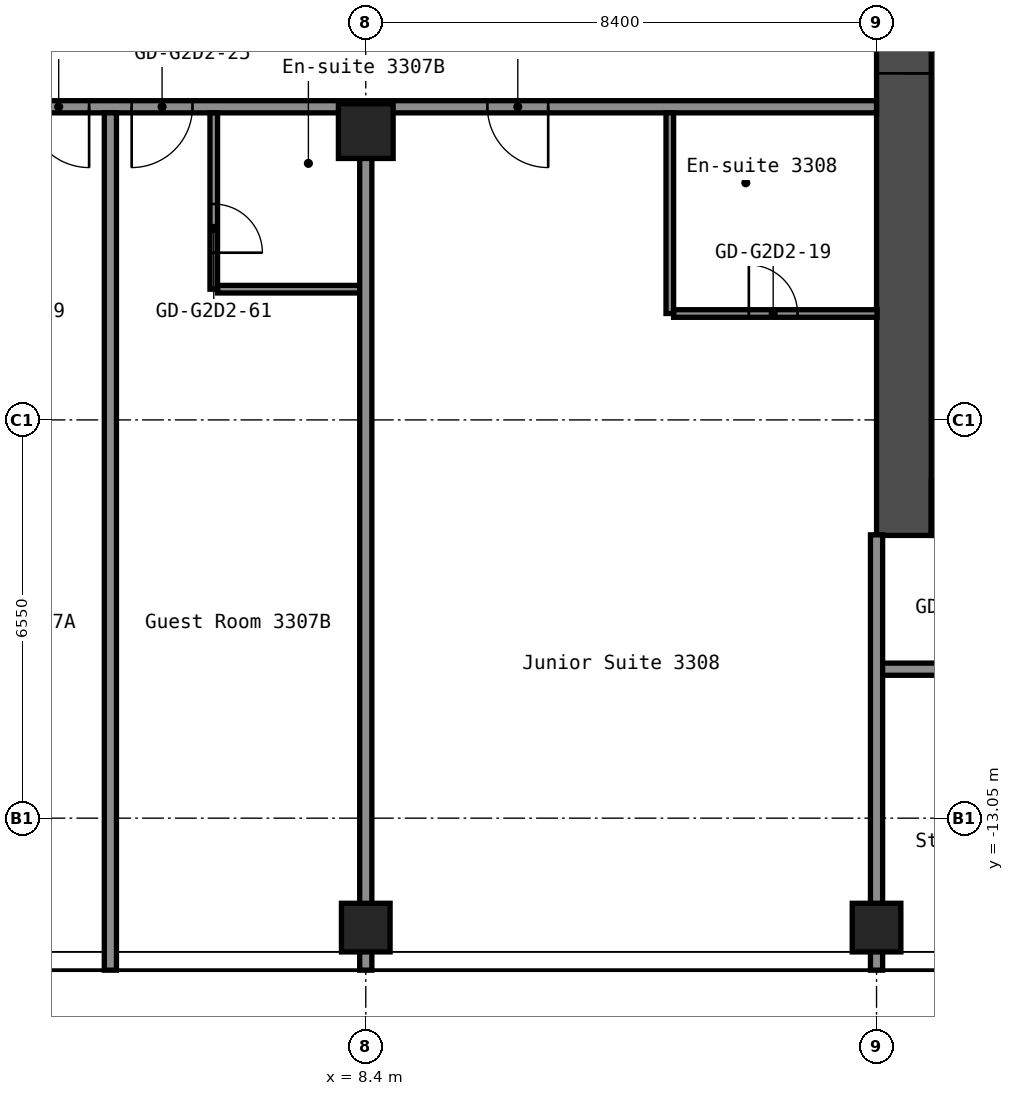
"""IFC4 building model, lengths in metres.
Left out: names, types, materials, properties, quantities, classifications, styles, units other than length and angle.
Written with IfcOpenShell. Run it as: python <this file> out.ifc"""

import sys

from ifc_helpers import new_model, si_unit, direction, frame, frame_2d, origin, origin_2d, place, context, subcontext, project, spatial, rectangle, hollow_rectangle, extrude, element, fill, save


model = new_model("IFC4")
c1 = context("Model", 3, precision=1e-05, world=origin(), true_north=direction((0.0, 1.0)))
c2 = subcontext(c1, "Body", "Model", "MODEL_VIEW")
j1 = project(units=[si_unit("LENGTHUNIT", "METRE"), si_unit("PLANEANGLEUNIT", "RADIAN")], contexts=[c1])
p1 = place(None, origin())
s1 = spatial("IfcSite", under=j1, at=p1, CompositionType="ELEMENT")
p2 = place(p1, origin())
s2 = spatial("IfcBuilding", under=s1, at=p2, CompositionType="ELEMENT")
p3 = place(p2, frame((0.0, 0.0, 117.0)))
s3 = spatial("IfcBuildingStorey", under=s2, at=p3, CompositionType="ELEMENT", Elevation=117.0)
p4 = place(p3, frame((8.4, -14.85, 0.0), z_axis=(0.0, 0.0, 1.0), x_axis=(1.0, 0.0, 0.0)))
e1 = element("IfcColumn", 1, at=p4, inside=s3, PredefinedType="COLUMN", context=c2, shape_type="SweptSolid", body=[
    extrude(hollow_rectangle(XDim=0.8, YDim=0.8, WallThickness=0.032, at=origin_2d()), origin(), (0.0, 0.0, 1.0), 2.9),
])
p5 = place(p3, frame((8.4, -1.75, 0.0), z_axis=(0.0, 0.0, 1.0), x_axis=(1.0, 0.0, 0.0)))
e2 = element("IfcColumn", 2, at=p5, inside=s3, PredefinedType="COLUMN", context=c2, shape_type="SweptSolid", body=[
    extrude(hollow_rectangle(XDim=0.9, YDim=0.9, WallThickness=0.036, at=origin_2d()), origin(), (0.0, 0.0, 1.0), 2.9),
])
p6 = place(p3, frame((16.8, -14.85, 0.0), z_axis=(0.0, 0.0, 1.0), x_axis=(1.0, 0.0, 0.0)))
e3 = element("IfcColumn", 3, at=p6, inside=s3, PredefinedType="COLUMN", context=c2, shape_type="SweptSolid", body=[
    extrude(hollow_rectangle(XDim=0.8, YDim=0.8, WallThickness=0.032, at=origin_2d()), origin(), (0.0, 0.0, 1.0), 2.9),
])
p7 = place(p3, frame((17.25, -8.4, 0.0), z_axis=(0.0, 0.0, 1.0), x_axis=(0.0, 1.0, 0.0)))
e4 = element("IfcWall", 4, at=p7, inside=s3, PredefinedType="SHEAR", context=c2, shape_type="SweptSolid", body=[
    extrude(rectangle(XDim=16.8, YDim=0.9, at=frame_2d((8.4, 0.0))), origin(), (0.0, 0.0, 1.0), 2.9),
])
p8 = place(p7, frame((7.6, 0.0, 0.0)))
e5 = element("IfcOpeningElement", 5, at=p8, cuts=e4, PredefinedType="OPENING", context=c2, shape_type="SweptSolid", body=[
    extrude(rectangle(XDim=1.2, YDim=2.1, at=frame_2d((0.6, 1.05))), frame((0.0, 0.46, 0.0), z_axis=(0.0, -1.0, 0.0), x_axis=(1.0, 0.0, 0.0)), (0.0, 0.0, 1.0), 0.92),
])
p9 = place(p3, frame((17.7, -7.95, 0.0), z_axis=(0.0, 0.0, 1.0), x_axis=(1.0, 0.0, 0.0)))
e6 = element("IfcWall", 6, at=p9, inside=s3, PredefinedType="SHEAR", context=c2, shape_type="SweptSolid", body=[
    extrude(rectangle(XDim=15.0, YDim=0.9, at=frame_2d((7.5, 0.0))), origin(), (0.0, 0.0, 1.0), 2.9),
])
p10 = place(p9, frame((2.55, 0.0, 0.0)))
e7 = element("IfcOpeningElement", 7, at=p10, cuts=e6, PredefinedType="OPENING", context=c2, shape_type="SweptSolid", body=[
    extrude(rectangle(XDim=1.0, YDim=2.1, at=frame_2d((0.5, 1.05))), frame((0.0, 0.46, 0.0), z_axis=(0.0, -1.0, 0.0), x_axis=(1.0, 0.0, 0.0)), (0.0, 0.0, 1.0), 0.92),
])
p11 = place(p3, frame((16.8, -10.6, 0.0), z_axis=(0.0, 0.0, 1.0), x_axis=(1.0, 0.0, 0.0)))
e8 = element("IfcWall", 8, at=p11, inside=s3, PredefinedType="PARTITIONING", context=c2, shape_type="SweptSolid", body=[
    extrude(rectangle(XDim=29.7, YDim=0.2, at=frame_2d((14.85, 0.0))), origin(), (0.0, 0.0, 1.0), 2.9),
])
p12 = place(p11, frame((1.145, 0.0, 0.0)))
e9 = element("IfcOpeningElement", 9, at=p12, cuts=e8, PredefinedType="OPENING", context=c2, shape_type="SweptSolid", body=[
    extrude(rectangle(XDim=0.9, YDim=2.1, at=frame_2d((0.45, 1.05))), frame((0.0, 0.11, 0.0), z_axis=(0.0, -1.0, 0.0), x_axis=(1.0, 0.0, 0.0)), (0.0, 0.0, 1.0), 0.22),
])
p13 = place(p11, frame((5.345, 0.0, 0.0)))
e10 = element("IfcOpeningElement", 10, at=p13, cuts=e8, PredefinedType="OPENING", context=c2, shape_type="SweptSolid", body=[
    extrude(rectangle(XDim=0.9, YDim=2.1, at=frame_2d((0.45, 1.05))), frame((0.0, 0.11, 0.0), z_axis=(0.0, -1.0, 0.0), x_axis=(1.0, 0.0, 0.0)), (0.0, 0.0, 1.0), 0.22),
])
p14 = place(p11, frame((10.22, 0.0, 0.0)))
e11 = element("IfcOpeningElement", 11, at=p14, cuts=e8, PredefinedType="OPENING", context=c2, shape_type="SweptSolid", body=[
    extrude(rectangle(XDim=0.9, YDim=2.1, at=frame_2d((0.45, 1.05))), frame((0.0, 0.11, 0.0), z_axis=(0.0, -1.0, 0.0), x_axis=(1.0, 0.0, 0.0)), (0.0, 0.0, 1.0), 0.22),
])
p15 = place(p11, frame((14.42, 0.0, 0.0)))
e12 = element("IfcOpeningElement", 12, at=p15, cuts=e8, PredefinedType="OPENING", context=c2, shape_type="SweptSolid", body=[
    extrude(rectangle(XDim=0.9, YDim=2.1, at=frame_2d((0.45, 1.05))), frame((0.0, 0.11, 0.0), z_axis=(0.0, -1.0, 0.0), x_axis=(1.0, 0.0, 0.0)), (0.0, 0.0, 1.0), 0.22),
])
p16 = place(p11, frame((18.7, 0.0, 0.0)))
e13 = element("IfcOpeningElement", 13, at=p16, cuts=e8, PredefinedType="OPENING", context=c2, shape_type="SweptSolid", body=[
    extrude(rectangle(XDim=0.9, YDim=2.1, at=frame_2d((0.45, 1.05))), frame((0.0, 0.11, 0.0), z_axis=(0.0, -1.0, 0.0), x_axis=(1.0, 0.0, 0.0)), (0.0, 0.0, 1.0), 0.22),
])
p17 = place(p11, frame((22.9, 0.0, 0.0)))
e14 = element("IfcOpeningElement", 14, at=p17, cuts=e8, PredefinedType="OPENING", context=c2, shape_type="SweptSolid", body=[
    extrude(rectangle(XDim=0.9, YDim=2.1, at=frame_2d((0.45, 1.05))), frame((0.0, 0.11, 0.0), z_axis=(0.0, -1.0, 0.0), x_axis=(1.0, 0.0, 0.0)), (0.0, 0.0, 1.0), 0.22),
])
p18 = place(p11, frame((26.85, 0.0, 0.0)))
e15 = element("IfcOpeningElement", 15, at=p18, cuts=e8, PredefinedType="OPENING", context=c2, shape_type="SweptSolid", body=[
    extrude(rectangle(XDim=0.9, YDim=2.1, at=frame_2d((0.45, 1.05))), frame((0.0, 0.11, 0.0), z_axis=(0.0, -1.0, 0.0), x_axis=(1.0, 0.0, 0.0)), (0.0, 0.0, 1.0), 0.22),
])
p19 = place(p3, frame((13.462, -4.75, 0.0), z_axis=(0.0, 0.0, 1.0), x_axis=(1.0, 0.0, 0.0)))
e16 = element("IfcWall", 16, at=p19, inside=s3, PredefinedType="PARTITIONING", context=c2, shape_type="SweptSolid", body=[
    extrude(rectangle(XDim=3.348, YDim=0.125, at=frame_2d((1.674, 0.0))), origin(), (0.0, 0.0, 1.0), 2.9),
])
p20 = place(p19, frame((1.238, 0.0, 0.0)))
e17 = element("IfcOpeningElement", 17, at=p20, cuts=e16, PredefinedType="OPENING", context=c2, shape_type="SweptSolid", body=[
    extrude(rectangle(XDim=0.8, YDim=2.1, at=frame_2d((0.4, 1.05))), frame((0.0, 0.073, 0.0), z_axis=(0.0, -1.0, 0.0), x_axis=(1.0, 0.0, 0.0)), (0.0, 0.0, 1.0), 0.145),
])
p21 = place(p3, frame((5.962, -4.35, 0.0), z_axis=(0.0, 0.0, 1.0), x_axis=(1.0, 0.0, 0.0)))
e18 = element("IfcWall", 18, at=p21, inside=s3, PredefinedType="PARTITIONING", context=c2, shape_type="SweptSolid", body=[
    extrude(rectangle(XDim=2.338, YDim=0.125, at=frame_2d((1.169, 0.0))), origin(), (0.0, 0.0, 1.0), 2.9),
])
p22 = place(p3, frame((-16.8, -1.35, 0.0), z_axis=(0.0, 0.0, 1.0), x_axis=(1.0, 0.0, 0.0)))
e19 = element("IfcWall", 19, at=p22, inside=s3, PredefinedType="PARTITIONING", context=c2, shape_type="SweptSolid", body=[
    extrude(rectangle(XDim=33.6, YDim=0.2, at=frame_2d((16.8, 0.0))), origin(), (0.0, 0.0, 1.0), 2.9),
])
p23 = place(p22, frame((2.85, 0.0, 0.0)))
e20 = element("IfcOpeningElement", 20, at=p23, cuts=e19, PredefinedType="OPENING", context=c2, shape_type="SweptSolid", body=[
    extrude(rectangle(XDim=1.0, YDim=2.1, at=frame_2d((0.5, 1.05))), frame((0.0, 0.11, 0.0), z_axis=(0.0, -1.0, 0.0), x_axis=(1.0, 0.0, 0.0)), (0.0, 0.0, 1.0), 0.22),
])
p24 = place(p22, frame((4.55, 0.0, 0.0)))
e21 = element("IfcOpeningElement", 21, at=p24, cuts=e19, PredefinedType="OPENING", context=c2, shape_type="SweptSolid", body=[
    extrude(rectangle(XDim=1.0, YDim=2.1, at=frame_2d((0.5, 1.05))), frame((0.0, 0.11, 0.0), z_axis=(0.0, -1.0, 0.0), x_axis=(1.0, 0.0, 0.0)), (0.0, 0.0, 1.0), 0.22),
])
p25 = place(p22, frame((9.88, 0.0, 0.0)))
e22 = element("IfcOpeningElement", 22, at=p25, cuts=e19, PredefinedType="OPENING", context=c2, shape_type="SweptSolid", body=[
    extrude(rectangle(XDim=0.9, YDim=2.1, at=frame_2d((0.45, 1.05))), frame((0.0, 0.11, 0.0), z_axis=(0.0, -1.0, 0.0), x_axis=(1.0, 0.0, 0.0)), (0.0, 0.0, 1.0), 0.22),
])
p26 = place(p22, frame((14.08, 0.0, 0.0)))
e23 = element("IfcOpeningElement", 23, at=p26, cuts=e19, PredefinedType="OPENING", context=c2, shape_type="SweptSolid", body=[
    extrude(rectangle(XDim=0.9, YDim=2.1, at=frame_2d((0.45, 1.05))), frame((0.0, 0.11, 0.0), z_axis=(0.0, -1.0, 0.0), x_axis=(1.0, 0.0, 0.0)), (0.0, 0.0, 1.0), 0.22),
])
p27 = place(p22, frame((19.65, 0.0, 0.0)))
e24 = element("IfcOpeningElement", 24, at=p27, cuts=e19, PredefinedType="OPENING", context=c2, shape_type="SweptSolid", body=[
    extrude(rectangle(XDim=1.0, YDim=2.1, at=frame_2d((0.5, 1.05))), frame((0.0, 0.11, 0.0), z_axis=(0.0, -1.0, 0.0), x_axis=(1.0, 0.0, 0.0)), (0.0, 0.0, 1.0), 0.22),
])
p28 = place(p22, frame((21.35, 0.0, 0.0)))
e25 = element("IfcOpeningElement", 25, at=p28, cuts=e19, PredefinedType="OPENING", context=c2, shape_type="SweptSolid", body=[
    extrude(rectangle(XDim=1.0, YDim=2.1, at=frame_2d((0.5, 1.05))), frame((0.0, 0.11, 0.0), z_axis=(0.0, -1.0, 0.0), x_axis=(1.0, 0.0, 0.0)), (0.0, 0.0, 1.0), 0.22),
])
p29 = place(p22, frame((27.2, 0.0, 0.0)))
e26 = element("IfcOpeningElement", 26, at=p29, cuts=e19, PredefinedType="OPENING", context=c2, shape_type="SweptSolid", body=[
    extrude(rectangle(XDim=1.0, YDim=2.1, at=frame_2d((0.5, 1.05))), frame((0.0, 0.11, 0.0), z_axis=(0.0, -1.0, 0.0), x_axis=(1.0, 0.0, 0.0)), (0.0, 0.0, 1.0), 0.22),
])
p30 = place(p3, frame((4.2, -15.55, 0.0), z_axis=(0.0, 0.0, 1.0), x_axis=(0.0, 1.0, 0.0)))
e27 = element("IfcWall", 27, at=p30, inside=s3, PredefinedType="PARTITIONING", context=c2, shape_type="SweptSolid", body=[
    extrude(rectangle(XDim=14.1, YDim=0.2, at=frame_2d((7.05, 0.0))), origin(), (0.0, 0.0, 1.0), 2.9),
])
p31 = place(p3, frame((5.9, -4.35, 0.0), z_axis=(0.0, 0.0, 1.0), x_axis=(0.0, 1.0, 0.0)))
e28 = element("IfcWall", 28, at=p31, inside=s3, PredefinedType="PARTITIONING", context=c2, shape_type="SweptSolid", body=[
    extrude(rectangle(XDim=2.9, YDim=0.125, at=frame_2d((1.45, 0.0))), origin(), (0.0, 0.0, 1.0), 2.9),
])
p32 = place(p31, frame((0.6, 0.0, 0.0)))
e29 = element("IfcOpeningElement", 29, at=p32, cuts=e28, PredefinedType="OPENING", context=c2, shape_type="SweptSolid", body=[
    extrude(rectangle(XDim=0.8, YDim=2.1, at=frame_2d((0.4, 1.05))), frame((0.0, 0.073, 0.0), z_axis=(0.0, -1.0, 0.0), x_axis=(1.0, 0.0, 0.0)), (0.0, 0.0, 1.0), 0.145),
])
p33 = place(p3, frame((8.4, -15.55, 0.0), z_axis=(0.0, 0.0, 1.0), x_axis=(0.0, 1.0, 0.0)))
e30 = element("IfcWall", 30, at=p33, inside=s3, PredefinedType="PARTITIONING", context=c2, shape_type="SweptSolid", body=[
    extrude(rectangle(XDim=13.36, YDim=0.2, at=frame_2d((6.68, 0.0))), origin(), (0.0, 0.0, 1.0), 2.9),
])
p34 = place(p3, frame((13.4, -4.75, 0.0), z_axis=(0.0, 0.0, 1.0), x_axis=(0.0, 1.0, 0.0)))
e31 = element("IfcWall", 31, at=p34, inside=s3, PredefinedType="PARTITIONING", context=c2, shape_type="SweptSolid", body=[
    extrude(rectangle(XDim=3.3, YDim=0.125, at=frame_2d((1.65, 0.0))), origin(), (0.0, 0.0, 1.0), 2.9),
])
p35 = place(p3, frame((16.8, -15.55, 0.0), z_axis=(0.0, 0.0, 1.0), x_axis=(0.0, 1.0, 0.0)))
e32 = element("IfcWall", 32, at=p35, inside=s3, PredefinedType="PARTITIONING", context=c2, shape_type="SweptSolid", body=[
    extrude(rectangle(XDim=7.16, YDim=0.2, at=frame_2d((3.58, 0.0))), origin(), (0.0, 0.0, 1.0), 2.9),
])
p36 = place(p8, origin())
e33 = element("IfcDoor", 33, at=p36, inside=s3, OperationType="DOUBLE_DOOR_SINGLE_SWING", PredefinedType="DOOR", context=c2, shape_type="SweptSolid", body=[
    extrude(rectangle(XDim=1.2, YDim=2.1, at=frame_2d((0.6, 1.05))), frame((0.0, 0.025, 0.0), z_axis=(0.0, -1.0, 0.0), x_axis=(1.0, 0.0, 0.0)), (0.0, 0.0, 1.0), 0.05),
])
fill(e5, e33)
p37 = place(p20, origin())
e34 = element("IfcDoor", 34, at=p37, inside=s3, OperationType="SINGLE_SWING_RIGHT", PredefinedType="DOOR", context=c2, shape_type="SweptSolid", body=[
    extrude(rectangle(XDim=0.8, YDim=2.1, at=frame_2d((0.4, 1.05))), frame((0.0, 0.025, 0.0), z_axis=(0.0, -1.0, 0.0), x_axis=(1.0, 0.0, 0.0)), (0.0, 0.0, 1.0), 0.05),
])
fill(e17, e34)
p38 = place(p27, origin())
e35 = element("IfcDoor", 35, at=p38, inside=s3, OperationType="SINGLE_SWING_RIGHT", PredefinedType="DOOR", context=c2, shape_type="SweptSolid", body=[
    extrude(rectangle(XDim=1.0, YDim=2.1, at=frame_2d((0.5, 1.05))), frame((0.0, 0.025, 0.0), z_axis=(0.0, -1.0, 0.0), x_axis=(1.0, 0.0, 0.0)), (0.0, 0.0, 1.0), 0.05),
])
fill(e24, e35)
p39 = place(p28, origin())
e36 = element("IfcDoor", 36, at=p39, inside=s3, OperationType="SINGLE_SWING_LEFT", PredefinedType="DOOR", context=c2, shape_type="SweptSolid", body=[
    extrude(rectangle(XDim=1.0, YDim=2.1, at=frame_2d((0.5, 1.05))), frame((0.0, 0.025, 0.0), z_axis=(0.0, -1.0, 0.0), x_axis=(1.0, 0.0, 0.0)), (0.0, 0.0, 1.0), 0.05),
])
fill(e25, e36)
p40 = place(p29, origin())
e37 = element("IfcDoor", 37, at=p40, inside=s3, OperationType="SINGLE_SWING_RIGHT", PredefinedType="DOOR", context=c2, shape_type="SweptSolid", body=[
    extrude(rectangle(XDim=1.0, YDim=2.1, at=frame_2d((0.5, 1.05))), frame((0.0, 0.025, 0.0), z_axis=(0.0, -1.0, 0.0), x_axis=(1.0, 0.0, 0.0)), (0.0, 0.0, 1.0), 0.05),
])
fill(e26, e37)
p41 = place(p32, origin())
e38 = element("IfcDoor", 38, at=p41, inside=s3, OperationType="SINGLE_SWING_LEFT", PredefinedType="DOOR", context=c2, shape_type="SweptSolid", body=[
    extrude(rectangle(XDim=0.8, YDim=2.1, at=frame_2d((0.4, 1.05))), frame((0.0, 0.025, 0.0), z_axis=(0.0, -1.0, 0.0), x_axis=(1.0, 0.0, 0.0)), (0.0, 0.0, 1.0), 0.05),
])
fill(e29, e38)
save(model, sys.argv[1])
